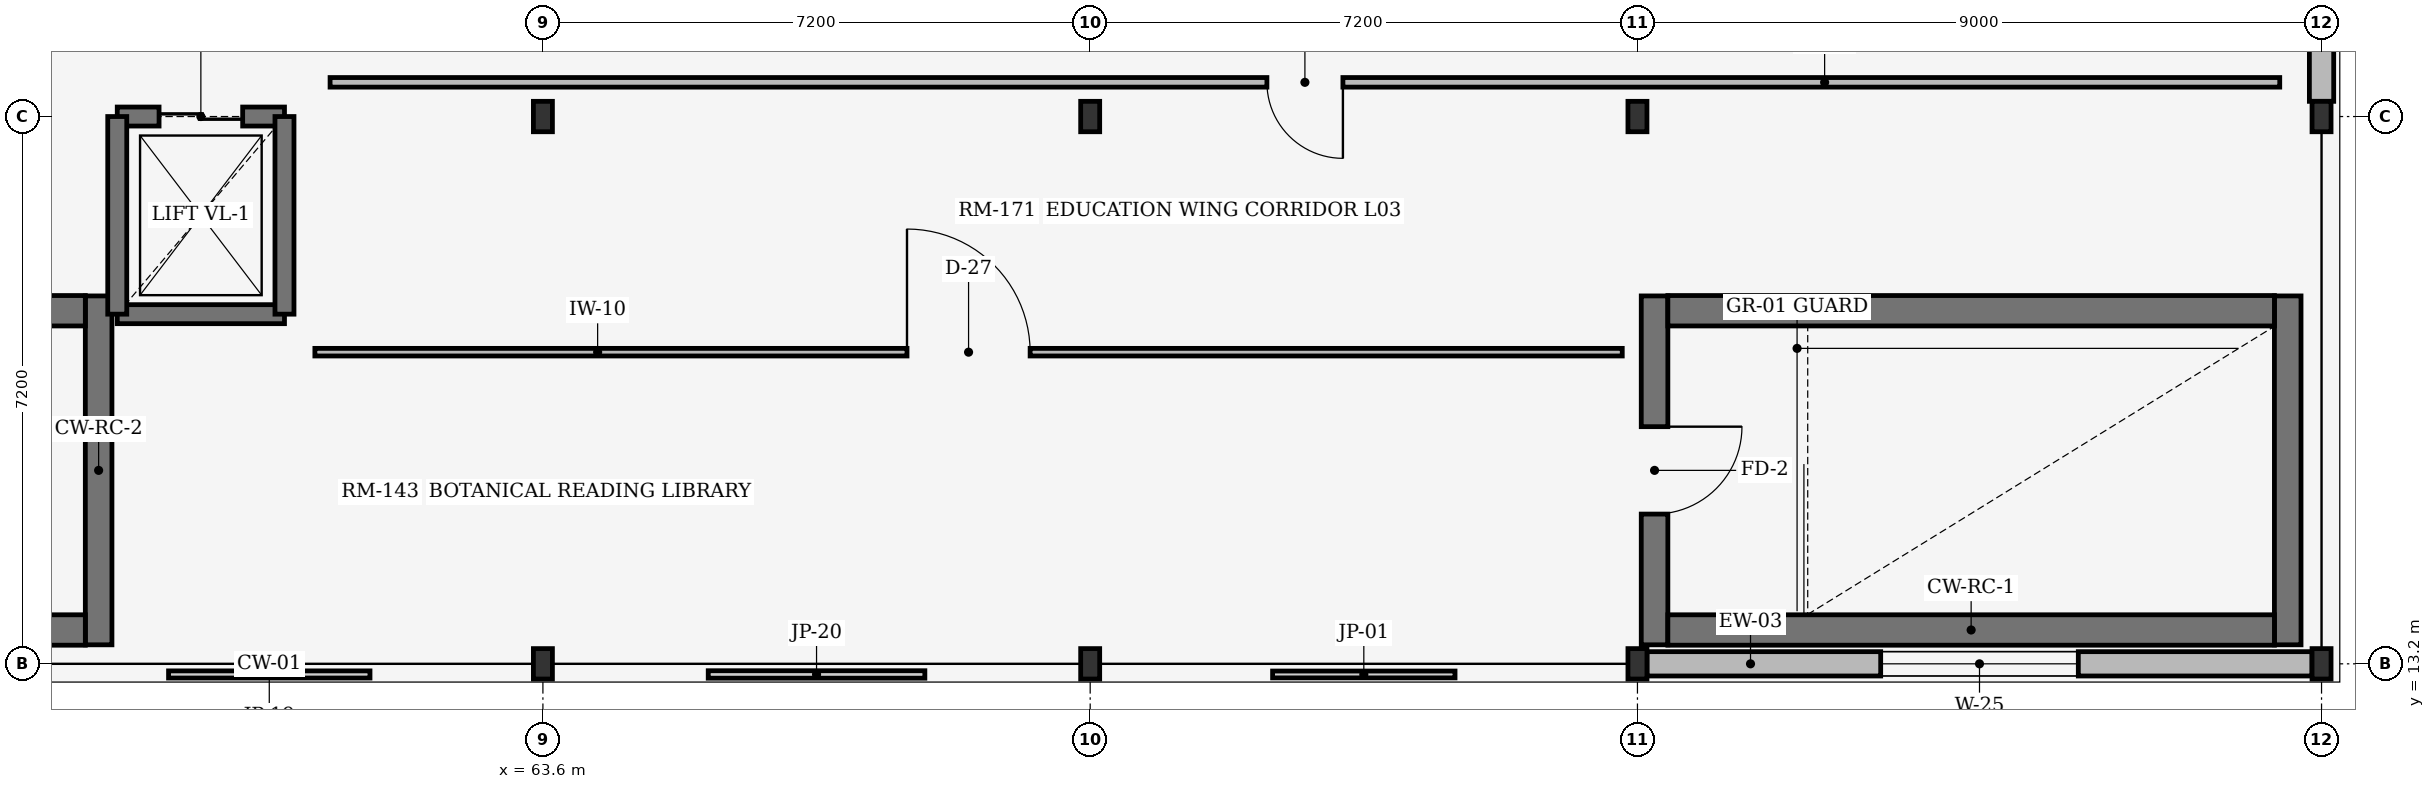
"""IFC4 building model, lengths in metres.
Left out: names, types, materials, properties, quantities, classifications, styles, units other than length and angle.
Written with IfcOpenShell. Run it as: python <this file> out.ifc"""

import sys

from ifc_helpers import new_model, si_unit, direction, frame, frame_2d, origin, origin_2d, place, context, subcontext, project, spatial, rectangle, i_section, extrude, element, fill, save


model = new_model("IFC4")
c1 = context("Model", 3, precision=1e-05, world=origin(), true_north=direction((0.0, 1.0)))
c2 = subcontext(c1, "Body", "Model", "MODEL_VIEW")
j1 = project(units=[si_unit("LENGTHUNIT", "METRE"), si_unit("PLANEANGLEUNIT", "RADIAN")], contexts=[c1])
p1 = place(None, origin())
s1 = spatial("IfcSite", under=j1, at=p1, CompositionType="ELEMENT")
p2 = place(p1, origin())
s2 = spatial("IfcBuilding", under=s1, at=p2, CompositionType="ELEMENT")
p3 = place(p2, frame((0.0, 0.0, 13.2)))
s3 = spatial("IfcBuildingStorey", under=s2, at=p3, CompositionType="ELEMENT", Elevation=13.2)
for number, where, z_axis, x_axis in (
    (1, (63.6, 13.2, 0.0), (0.0, 0.0, 1.0), (1.0, 0.0, 0.0)),
    (2, (63.6, 20.4, 0.0), (0.0, 0.0, 1.0), (1.0, 0.0, 0.0)),
    (3, (70.8, 13.2, 0.0), (0.0, 0.0, 1.0), (1.0, 0.0, 0.0)),
    (4, (70.8, 20.4, 0.0), (0.0, 0.0, 1.0), (1.0, 0.0, 0.0)),
    (5, (78.0, 13.2, 0.0), (0.0, 0.0, 1.0), (1.0, 0.0, 0.0)),
    (6, (78.0, 20.4, 0.0), (0.0, 0.0, 1.0), (1.0, 0.0, 0.0)),
    (7, (87.0, 13.2, 0.0), (0.0, 0.0, 1.0), (1.0, 0.0, 0.0)),
    (8, (87.0, 20.4, 0.0), (0.0, 0.0, 1.0), (1.0, 0.0, 0.0)),
):
    element("IfcColumn", number, at=place(p3, frame(where, z_axis=z_axis, x_axis=x_axis)), inside=s3, PredefinedType="COLUMN", context=c2, shape_type="SweptSolid", body=[
        extrude(i_section(OverallWidth=0.25, OverallDepth=0.4, WebThickness=0.01, FlangeThickness=0.013, at=origin_2d()), origin(), (0.0, 0.0, 1.0), 3.625),
    ])
p4 = place(p3, frame((78.125, 13.2, 0.0), z_axis=(0.0, 0.0, 1.0), x_axis=(1.0, 0.0, 0.0)))
e9 = element("IfcWall", 9, at=p4, inside=s3, PredefinedType="STANDARD", context=c2, shape_type="SweptSolid", body=[
    extrude(rectangle(XDim=8.75, YDim=0.32, at=frame_2d((4.375, 0.0))), origin(), (0.0, 0.0, 1.0), 3.1),
])
p5 = place(p4, frame((3.075, 0.0, 0.75)))
e10 = element("IfcOpeningElement", 10, at=p5, cuts=e9, PredefinedType="OPENING", context=c2, shape_type="SweptSolid", body=[
    extrude(rectangle(XDim=2.6, YDim=1.35, at=frame_2d((1.3, 0.675))), frame((0.0, 0.17, 0.0), z_axis=(0.0, -1.0, 0.0), x_axis=(1.0, 0.0, 0.0)), (0.0, 0.0, 1.0), 0.34),
])
p6 = place(p3, frame((87.0, 20.6, 0.0), z_axis=(0.0, 0.0, 1.0), x_axis=(0.0, 1.0, 0.0)))
e11 = element("IfcWall", 11, at=p6, inside=s3, PredefinedType="STANDARD", context=c2, shape_type="SweptSolid", body=[
    extrude(rectangle(XDim=6.8, YDim=0.32, at=frame_2d((3.4, 0.0))), origin(), (0.0, 0.0, 1.0), 3.1),
])
p7 = place(p3, frame((57.755, 13.45, 0.0), z_axis=(0.0, 0.0, 1.0), x_axis=(0.0, 1.0, 0.0)))
e12 = element("IfcWall", 12, at=p7, inside=s3, PredefinedType="SHEAR", context=c2, shape_type="SweptSolid", body=[
    extrude(rectangle(XDim=4.59, YDim=0.35, at=frame_2d((2.295, 0.0))), origin(), (0.0, 0.0, 1.0), 3.625),
])
for number, where, z_axis, x_axis in (
    (13, (49.6, 13.645, 0.0), (0.0, 0.0, 1.0), (1.0, 0.0, 0.0)),
    (14, (49.6, 17.845, 0.0), (0.0, 0.0, 1.0), (1.0, 0.0, 0.0)),
):
    element("IfcWall", number, at=place(p3, frame(where, z_axis=z_axis, x_axis=x_axis)), inside=s3, PredefinedType="SHEAR", context=c2, shape_type="SweptSolid", body=[
        extrude(rectangle(XDim=7.98, YDim=0.4, at=frame_2d((3.99, 0.0))), origin(), (0.0, 0.0, 1.0), 3.625),
    ])
p8 = place(p3, frame((78.225, 13.45, 0.0), z_axis=(0.0, 0.0, 1.0), x_axis=(0.0, 1.0, 0.0)))
e15 = element("IfcWall", 15, at=p8, inside=s3, PredefinedType="SHEAR", context=c2, shape_type="SweptSolid", body=[
    extrude(rectangle(XDim=4.59, YDim=0.35, at=frame_2d((2.295, 0.0))), origin(), (0.0, 0.0, 1.0), 3.635),
])
p9 = place(p8, frame((1.72, 0.0, 0.0)))
e16 = element("IfcOpeningElement", 16, at=p9, cuts=e15, PredefinedType="OPENING", context=c2, shape_type="SweptSolid", body=[
    extrude(rectangle(XDim=1.15, YDim=2.2, at=frame_2d((0.575, 1.1))), frame((0.0, 0.185, 0.0), z_axis=(0.0, -1.0, 0.0), x_axis=(1.0, 0.0, 0.0)), (0.0, 0.0, 1.0), 0.37),
])
p10 = place(p3, frame((86.555, 13.45, 0.0), z_axis=(0.0, 0.0, 1.0), x_axis=(0.0, 1.0, 0.0)))
e17 = element("IfcWall", 17, at=p10, inside=s3, PredefinedType="SHEAR", context=c2, shape_type="SweptSolid", body=[
    extrude(rectangle(XDim=4.59, YDim=0.35, at=frame_2d((2.295, 0.0))), origin(), (0.0, 0.0, 1.0), 3.635),
])
for number, where, z_axis, x_axis in (
    (18, (78.4, 13.645, 0.0), (0.0, 0.0, 1.0), (1.0, 0.0, 0.0)),
    (19, (78.4, 17.845, 0.0), (0.0, 0.0, 1.0), (1.0, 0.0, 0.0)),
):
    element("IfcWall", number, at=place(p3, frame(where, z_axis=z_axis, x_axis=x_axis)), inside=s3, PredefinedType="SHEAR", context=c2, shape_type="SweptSolid", body=[
        extrude(rectangle(XDim=7.98, YDim=0.4, at=frame_2d((3.99, 0.0))), origin(), (0.0, 0.0, 1.0), 3.635),
    ])
p11 = place(p3, frame((58.0, 17.8, 0.0), z_axis=(0.0, 0.0, 1.0), x_axis=(1.0, 0.0, 0.0)))
e20 = element("IfcWall", 20, at=p11, inside=s3, PredefinedType="SHEAR", context=c2, shape_type="SweptSolid", body=[
    extrude(rectangle(XDim=2.2, YDim=0.25, at=frame_2d((1.1, 0.0))), origin(), (0.0, 0.0, 1.0), 3.635),
])
p12 = place(p3, frame((58.0, 20.4, 0.0), z_axis=(0.0, 0.0, 1.0), x_axis=(1.0, 0.0, 0.0)))
e21 = element("IfcWall", 21, at=p12, inside=s3, PredefinedType="SHEAR", context=c2, shape_type="SweptSolid", body=[
    extrude(rectangle(XDim=2.2, YDim=0.25, at=frame_2d((1.1, 0.0))), origin(), (0.0, 0.0, 1.0), 3.635),
])
p13 = place(p12, frame((0.55, 0.0, 0.0)))
e22 = element("IfcOpeningElement", 22, at=p13, cuts=e21, PredefinedType="OPENING", context=c2, shape_type="SweptSolid", body=[
    extrude(rectangle(XDim=1.1, YDim=2.2, at=frame_2d((0.55, 1.1))), frame((0.0, 0.135, 0.0), z_axis=(0.0, -1.0, 0.0), x_axis=(1.0, 0.0, 0.0)), (0.0, 0.0, 1.0), 0.27),
])
for number, where, z_axis, x_axis in (
    (23, (58.0, 17.8, 0.0), (0.0, 0.0, 1.0), (0.0, 1.0, 0.0)),
    (24, (60.2, 17.8, 0.0), (0.0, 0.0, 1.0), (0.0, 1.0, 0.0)),
):
    element("IfcWall", number, at=place(p3, frame(where, z_axis=z_axis, x_axis=x_axis)), inside=s3, PredefinedType="SHEAR", context=c2, shape_type="SweptSolid", body=[
        extrude(rectangle(XDim=2.6, YDim=0.25, at=frame_2d((1.3, 0.0))), origin(), (0.0, 0.0, 1.0), 3.635),
    ])
p14 = place(p3, frame((60.6, 17.3, 0.0), z_axis=(0.0, 0.0, 1.0), x_axis=(1.0, 0.0, 0.0)))
e25 = element("IfcWall", 25, at=p14, inside=s3, PredefinedType="PARTITIONING", context=c2, shape_type="SweptSolid", body=[
    extrude(rectangle(XDim=17.2, YDim=0.1, at=frame_2d((8.6, 0.0))), origin(), (0.0, 0.0, 1.0), 3.615),
])
p15 = place(p14, frame((7.79, 0.0, 0.0)))
e26 = element("IfcOpeningElement", 26, at=p15, cuts=e25, PredefinedType="OPENING", context=c2, shape_type="SweptSolid", body=[
    extrude(rectangle(XDim=1.62, YDim=2.28, at=frame_2d((0.81, 1.14))), frame((0.0, 0.06, 0.0), z_axis=(0.0, -1.0, 0.0), x_axis=(1.0, 0.0, 0.0)), (0.0, 0.0, 1.0), 0.12),
])
p16 = place(p3, frame((60.8, 20.85, 0.0), z_axis=(0.0, 0.0, 1.0), x_axis=(1.0, 0.0, 0.0)))
e27 = element("IfcWall", 27, at=p16, inside=s3, PredefinedType="PARTITIONING", context=c2, shape_type="SweptSolid", body=[
    extrude(rectangle(XDim=25.65, YDim=0.126, at=frame_2d((12.825, 0.0))), origin(), (0.0, 0.0, 1.0), 3.615),
])
p17 = place(p16, frame((12.325, 0.0, 0.0)))
e28 = element("IfcOpeningElement", 28, at=p17, cuts=e27, PredefinedType="OPENING", context=c2, shape_type="SweptSolid", body=[
    extrude(rectangle(XDim=1.0, YDim=2.15, at=frame_2d((0.5, 1.075))), frame((0.0, 0.073, 0.0), z_axis=(0.0, -1.0, 0.0), x_axis=(1.0, 0.0, 0.0)), (0.0, 0.0, 1.0), 0.146),
])
p18 = place(p5, origin())
e29 = element("IfcWindow", 29, at=p18, inside=s3, PartitioningType="SINGLE_PANEL", PredefinedType="WINDOW", context=c2, shape_type="SweptSolid", body=[
    extrude(rectangle(XDim=2.6, YDim=1.35, at=frame_2d((1.3, 0.675))), frame((0.0, 0.03, 0.0), z_axis=(0.0, -1.0, 0.0), x_axis=(1.0, 0.0, 0.0)), (0.0, 0.0, 1.0), 0.06),
])
fill(e10, e29)
p19 = place(p9, origin())
e30 = element("IfcDoor", 30, at=p19, inside=s3, OperationType="SINGLE_SWING_RIGHT", PredefinedType="DOOR", context=c2, shape_type="SweptSolid", body=[
    extrude(rectangle(XDim=1.15, YDim=2.2, at=frame_2d((0.575, 1.1))), frame((0.0, 0.025, 0.0), z_axis=(0.0, -1.0, 0.0), x_axis=(1.0, 0.0, 0.0)), (0.0, 0.0, 1.0), 0.05),
])
fill(e16, e30)
p20 = place(p13, origin())
e31 = element("IfcDoor", 31, at=p20, inside=s3, OperationType="DOUBLE_DOOR_SLIDING", PredefinedType="DOOR", context=c2, shape_type="SweptSolid", body=[
    extrude(rectangle(XDim=1.1, YDim=2.2, at=frame_2d((0.55, 1.1))), frame((0.0, 0.025, 0.0), z_axis=(0.0, -1.0, 0.0), x_axis=(1.0, 0.0, 0.0)), (0.0, 0.0, 1.0), 0.05),
])
fill(e22, e31)
p21 = place(p15, origin())
e32 = element("IfcDoor", 32, at=p21, inside=s3, OperationType="DOUBLE_DOOR_SINGLE_SWING", PredefinedType="DOOR", context=c2, shape_type="SweptSolid", body=[
    extrude(rectangle(XDim=1.62, YDim=2.28, at=frame_2d((0.81, 1.14))), frame((0.0, 0.025, 0.0), z_axis=(0.0, -1.0, 0.0), x_axis=(1.0, 0.0, 0.0)), (0.0, 0.0, 1.0), 0.05),
])
fill(e26, e32)
p22 = place(p17, origin())
e33 = element("IfcDoor", 33, at=p22, inside=s3, OperationType="SINGLE_SWING_RIGHT", PredefinedType="DOOR", context=c2, shape_type="SweptSolid", body=[
    extrude(rectangle(XDim=1.0, YDim=2.15, at=frame_2d((0.5, 1.075))), frame((0.0, 0.025, 0.0), z_axis=(0.0, -1.0, 0.0), x_axis=(1.0, 0.0, 0.0)), (0.0, 0.0, 1.0), 0.05),
])
fill(e28, e33)
save(model, sys.argv[1])
